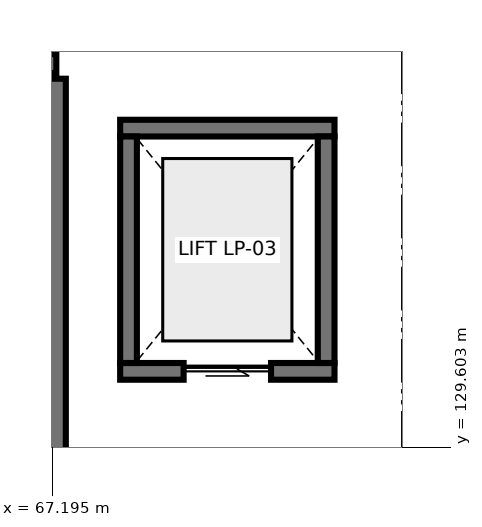
"""IFC4 building model, lengths in metres.
Left out: names, types, materials, properties, quantities, classifications, styles, units other than length and angle.
Written with IfcOpenShell. Run it as: python <this file> out.ifc"""

import sys

from ifc_helpers import new_model, si_unit, direction, frame, frame_2d, origin, place, context, subcontext, project, spatial, rectangle, extrude, element, fill, save


model = new_model("IFC4")
c1 = context("Model", 3, precision=1e-05, world=origin(), true_north=direction((0.0, 1.0)))
c2 = subcontext(c1, "Body", "Model", "MODEL_VIEW")
j1 = project(units=[si_unit("LENGTHUNIT", "METRE"), si_unit("PLANEANGLEUNIT", "RADIAN")], contexts=[c1])
p1 = place(None, origin())
s1 = spatial("IfcSite", under=j1, at=p1, CompositionType="ELEMENT")
p2 = place(p1, origin())
s2 = spatial("IfcBuilding", under=s1, at=p2, CompositionType="ELEMENT")
p3 = place(p2, frame((0.0, 0.0, -5.4)))
s3 = spatial("IfcBuildingStorey", under=s2, at=p3, CompositionType="ELEMENT", Elevation=-5.4)
p4 = place(p3, frame((58.95, 134.65, 0.0), z_axis=(0.0, 0.0, 1.0), x_axis=(1.0, 0.0, 0.0)))
e1 = element("IfcWall", 1, at=p4, inside=s3, PredefinedType="SHEAR", context=c2, shape_type="SweptSolid", body=[
    extrude(rectangle(XDim=8.3, YDim=0.25, at=frame_2d((4.15, 0.0))), origin(), (0.0, 0.0, 1.0), 5.1),
])
p5 = place(p3, frame((67.25, 134.45, 0.0), z_axis=(0.0, 0.0, 1.0), x_axis=(0.0, -1.0, 0.0)))
e2 = element("IfcWall", 2, at=p5, inside=s3, PredefinedType="SHEAR", context=c2, shape_type="SweptSolid", body=[
    extrude(rectangle(XDim=5.3, YDim=0.25, at=frame_2d((2.65, 0.0))), origin(), (0.0, 0.0, 1.0), 5.1),
])
p6 = place(p3, frame((68.09, 130.6, 0.0), z_axis=(0.0, 0.0, 1.0), x_axis=(1.0, 0.0, 0.0)))
e3 = element("IfcWall", 3, at=p6, inside=s3, PredefinedType="SHEAR", context=c2, shape_type="SweptSolid", body=[
    extrude(rectangle(XDim=2.82, YDim=0.22, at=frame_2d((1.41, 0.0))), origin(), (0.0, 0.0, 1.0), 5.1),
])
p7 = place(p6, frame((0.835, 0.0, 0.0)))
e4 = element("IfcOpeningElement", 4, at=p7, cuts=e3, PredefinedType="OPENING", context=c2, shape_type="SweptSolid", body=[
    extrude(rectangle(XDim=1.15, YDim=2.2, at=frame_2d((0.575, 1.1))), frame((0.0, 0.12, 0.0), z_axis=(0.0, -1.0, 0.0), x_axis=(1.0, 0.0, 0.0)), (0.0, 0.0, 1.0), 0.24),
])
p8 = place(p3, frame((68.09, 133.8, 0.0), z_axis=(0.0, 0.0, 1.0), x_axis=(1.0, 0.0, 0.0)))
e5 = element("IfcWall", 5, at=p8, inside=s3, PredefinedType="SHEAR", context=c2, shape_type="SweptSolid", body=[
    extrude(rectangle(XDim=2.82, YDim=0.22, at=frame_2d((1.41, 0.0))), origin(), (0.0, 0.0, 1.0), 5.1),
])
for number, where, z_axis, x_axis in (
    (6, (68.2, 130.71, 0.0), (0.0, 0.0, 1.0), (0.0, 1.0, 0.0)),
    (7, (70.8, 130.71, 0.0), (0.0, 0.0, 1.0), (0.0, 1.0, 0.0)),
):
    element("IfcWall", number, at=place(p3, frame(where, z_axis=z_axis, x_axis=x_axis)), inside=s3, PredefinedType="SHEAR", context=c2, shape_type="SweptSolid", body=[
        extrude(rectangle(XDim=2.98, YDim=0.22, at=frame_2d((1.49, 0.0))), origin(), (0.0, 0.0, 1.0), 5.1),
    ])
p9 = place(p7, origin())
e8 = element("IfcDoor", 8, at=p9, inside=s3, OperationType="SLIDING_TO_LEFT", PredefinedType="DOOR", context=c2, shape_type="SweptSolid", body=[
    extrude(rectangle(XDim=1.15, YDim=2.2, at=frame_2d((0.575, 1.1))), frame((0.0, 0.025, 0.0), z_axis=(0.0, -1.0, 0.0), x_axis=(1.0, 0.0, 0.0)), (0.0, 0.0, 1.0), 0.05),
])
fill(e4, e8)
save(model, sys.argv[1])
